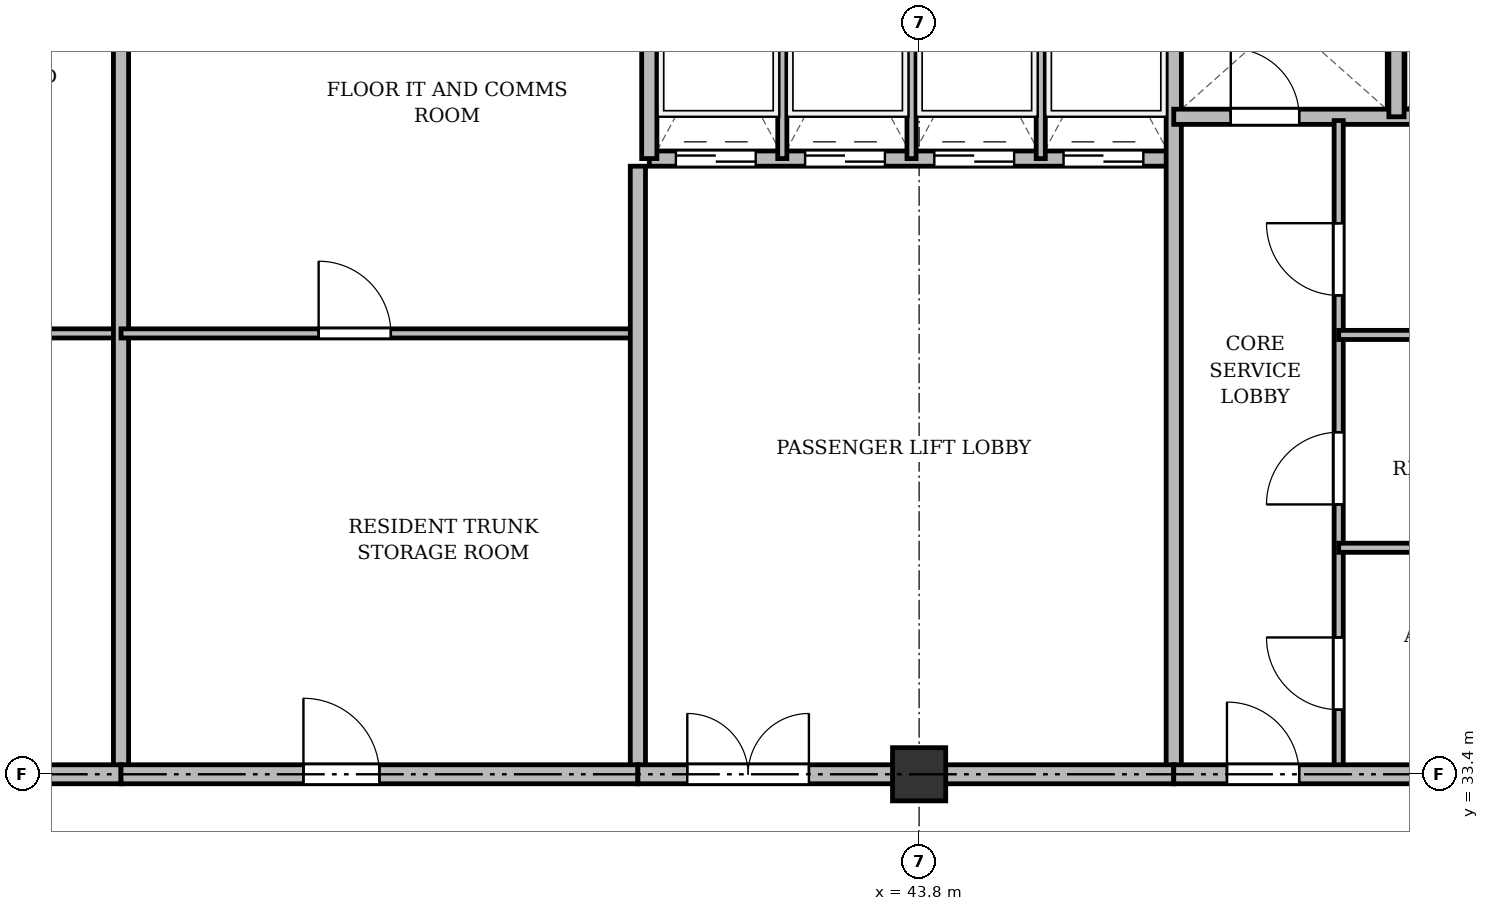
"""IFC4 building model, lengths in metres.
Left out: names, types, materials, properties, quantities, classifications, styles, units other than length and angle.
Written with IfcOpenShell. Run it as: python <this file> out.ifc"""

import sys

from ifc_helpers import new_model, si_unit, direction, frame, frame_2d, origin, origin_2d, place, context, subcontext, project, spatial, rectangle, extrude, source, transform, mapped, element, fill, save


model = new_model("IFC4")
c1 = context("Model", 3, precision=1e-05, world=origin(), true_north=direction((0.0, 1.0)))
c2 = subcontext(c1, "Body", "Model", "MODEL_VIEW")
j1 = project(units=[si_unit("LENGTHUNIT", "METRE"), si_unit("PLANEANGLEUNIT", "RADIAN")], contexts=[c1])
p1 = place(None, origin())
s1 = spatial("IfcSite", under=j1, at=p1, CompositionType="ELEMENT")
p2 = place(p1, origin())
s2 = spatial("IfcBuilding", under=s1, at=p2, CompositionType="ELEMENT")
p3 = place(p2, frame((0.0, 0.0, 222.9)))
s3 = spatial("IfcBuildingStorey", under=s2, at=p3, CompositionType="ELEMENT", Elevation=222.9)
m1 = source(origin(), c2, "Body", "SweptSolid", [
    extrude(rectangle(XDim=0.7, YDim=0.7, at=origin_2d()), origin(), (0.0, 0.0, 1.0), 3.6),
])
p4 = place(p3, frame((43.8, 33.4, 0.0), z_axis=(0.0, 0.0, 1.0), x_axis=(1.0, 0.0, 0.0)))
e1 = element("IfcColumn", 1, at=p4, inside=s3, PredefinedType="COLUMN", context=c2, shape_type="MappedRepresentation", body=[
    mapped(m1, transform((0.0, 0.0, 0.0), x_axis=(1.0, 0.0, 0.0), y_axis=(0.0, 1.0, 0.0), z_axis=(0.0, 0.0, 1.0), scale=1.0)),
])
p5 = place(p3, frame((26.3, 39.2, 0.0), z_axis=(0.0, 0.0, 1.0), x_axis=(1.0, 0.0, 0.0)))
e2 = element("IfcWall", 2, at=p5, inside=s3, PredefinedType="PARTITIONING", context=c2, shape_type="SweptSolid", body=[
    extrude(rectangle(XDim=7.0, YDim=0.12, at=frame_2d((3.5, 0.0))), origin(), (0.0, 0.0, 1.0), 2.86),
])
p6 = place(p5, frame((2.6, 0.0, 0.0)))
e3 = element("IfcOpeningElement", 3, at=p6, cuts=e2, PredefinedType="OPENING", context=c2, shape_type="SweptSolid", body=[
    extrude(rectangle(XDim=0.95, YDim=2.15, at=frame_2d((0.475, 1.075))), frame((0.0, 0.07, 0.0), z_axis=(0.0, -1.0, 0.0), x_axis=(1.0, 0.0, 0.0)), (0.0, 0.0, 1.0), 0.14),
])
p7 = place(p3, frame((33.3, 33.4, 0.0), z_axis=(0.0, 0.0, 1.0), x_axis=(0.0, 1.0, 0.0)))
e4 = element("IfcWall", 4, at=p7, inside=s3, PredefinedType="SOLIDWALL", context=c2, shape_type="SweptSolid", body=[
    extrude(rectangle(XDim=11.3, YDim=0.2, at=frame_2d((5.65, 0.0))), origin(), (0.0, 0.0, 1.0), 2.91),
])
p8 = place(p3, frame((33.3, 39.2, 0.0), z_axis=(0.0, 0.0, 1.0), x_axis=(1.0, 0.0, 0.0)))
e5 = element("IfcWall", 5, at=p8, inside=s3, PredefinedType="PARTITIONING", context=c2, shape_type="SweptSolid", body=[
    extrude(rectangle(XDim=6.8, YDim=0.12, at=frame_2d((3.4, 0.0))), origin(), (0.0, 0.0, 1.0), 3.36),
])
p9 = place(p8, frame((2.6, 0.0, 0.0)))
e6 = element("IfcOpeningElement", 6, at=p9, cuts=e5, PredefinedType="OPENING", context=c2, shape_type="SweptSolid", body=[
    extrude(rectangle(XDim=0.95, YDim=2.15, at=frame_2d((0.475, 1.075))), frame((0.0, 0.07, 0.0), z_axis=(0.0, -1.0, 0.0), x_axis=(1.0, 0.0, 0.0)), (0.0, 0.0, 1.0), 0.14),
])
p10 = place(p3, frame((40.1, 33.4, 0.0), z_axis=(0.0, 0.0, 1.0), x_axis=(0.0, 1.0, 0.0)))
e7 = element("IfcWall", 7, at=p10, inside=s3, PredefinedType="SOLIDWALL", context=c2, shape_type="SweptSolid", body=[
    extrude(rectangle(XDim=8.0, YDim=0.2, at=frame_2d((4.0, 0.0))), origin(), (0.0, 0.0, 1.0), 2.91),
])
p11 = place(p3, frame((40.25, 41.5, 0.0), z_axis=(0.0, 0.0, 1.0), x_axis=(1.0, 0.0, 0.0)))
e8 = element("IfcWall", 8, at=p11, inside=s3, PredefinedType="SOLIDWALL", context=c2, shape_type="SweptSolid", body=[
    extrude(rectangle(XDim=6.9, YDim=0.2, at=frame_2d((3.45, 0.0))), origin(), (0.0, 0.0, 1.0), 3.36),
])
p12 = place(p11, frame((0.35, 0.0, 0.0)))
e9 = element("IfcOpeningElement", 9, at=p12, cuts=e8, PredefinedType="OPENING", context=c2, shape_type="SweptSolid", body=[
    extrude(rectangle(XDim=1.05, YDim=2.15, at=frame_2d((0.525, 1.075))), frame((0.0, 0.11, 0.0), z_axis=(0.0, -1.0, 0.0), x_axis=(1.0, 0.0, 0.0)), (0.0, 0.0, 1.0), 0.22),
])
p13 = place(p11, frame((2.05, 0.0, 0.0)))
e10 = element("IfcOpeningElement", 10, at=p13, cuts=e8, PredefinedType="OPENING", context=c2, shape_type="SweptSolid", body=[
    extrude(rectangle(XDim=1.05, YDim=2.15, at=frame_2d((0.525, 1.075))), frame((0.0, 0.11, 0.0), z_axis=(0.0, -1.0, 0.0), x_axis=(1.0, 0.0, 0.0)), (0.0, 0.0, 1.0), 0.22),
])
p14 = place(p11, frame((3.75, 0.0, 0.0)))
e11 = element("IfcOpeningElement", 11, at=p14, cuts=e8, PredefinedType="OPENING", context=c2, shape_type="SweptSolid", body=[
    extrude(rectangle(XDim=1.05, YDim=2.15, at=frame_2d((0.525, 1.075))), frame((0.0, 0.11, 0.0), z_axis=(0.0, -1.0, 0.0), x_axis=(1.0, 0.0, 0.0)), (0.0, 0.0, 1.0), 0.22),
])
p15 = place(p11, frame((5.45, 0.0, 0.0)))
e12 = element("IfcOpeningElement", 12, at=p15, cuts=e8, PredefinedType="OPENING", context=c2, shape_type="SweptSolid", body=[
    extrude(rectangle(XDim=1.05, YDim=2.15, at=frame_2d((0.525, 1.075))), frame((0.0, 0.11, 0.0), z_axis=(0.0, -1.0, 0.0), x_axis=(1.0, 0.0, 0.0)), (0.0, 0.0, 1.0), 0.22),
])
p16 = place(p3, frame((40.25, 41.5, 0.0), z_axis=(0.0, 0.0, 1.0), x_axis=(0.0, 1.0, 0.0)))
e13 = element("IfcWall", 13, at=p16, inside=s3, PredefinedType="SOLIDWALL", context=c2, shape_type="SweptSolid", body=[
    extrude(rectangle(XDim=3.2, YDim=0.2, at=frame_2d((1.6, 0.0))), origin(), (0.0, 0.0, 1.0), 3.36),
])
for number, where, z_axis, x_axis in (
    (14, (42.0, 41.5, 0.0), (0.0, 0.0, 1.0), (0.0, 1.0, 0.0)),
    (15, (43.7, 41.5, 0.0), (0.0, 0.0, 1.0), (0.0, 1.0, 0.0)),
    (16, (45.4, 41.5, 0.0), (0.0, 0.0, 1.0), (0.0, 1.0, 0.0)),
):
    element("IfcWall", number, at=place(p3, frame(where, z_axis=z_axis, x_axis=x_axis)), inside=s3, PredefinedType="PARTITIONING", context=c2, shape_type="SweptSolid", body=[
        extrude(rectangle(XDim=3.2, YDim=0.12, at=frame_2d((1.6, 0.0))), origin(), (0.0, 0.0, 1.0), 3.36),
    ])
p17 = place(p3, frame((47.15, 33.4, 0.0), z_axis=(0.0, 0.0, 1.0), x_axis=(0.0, 1.0, 0.0)))
e17 = element("IfcWall", 17, at=p17, inside=s3, PredefinedType="SOLIDWALL", context=c2, shape_type="SweptSolid", body=[
    extrude(rectangle(XDim=11.3, YDim=0.2, at=frame_2d((5.65, 0.0))), origin(), (0.0, 0.0, 1.0), 2.91),
])
p18 = place(p3, frame((26.3, 33.4, 0.0), z_axis=(0.0, 0.0, 1.0), x_axis=(1.0, 0.0, 0.0)))
e18 = element("IfcWall", 18, at=p18, inside=s3, PredefinedType="PARTITIONING", context=c2, shape_type="SweptSolid", body=[
    extrude(rectangle(XDim=7.0, YDim=0.25, at=frame_2d((3.5, 0.0))), origin(), (0.0, 0.0, 1.0), 2.91),
])
p19 = place(p18, frame((1.35, 0.0, 0.0)))
e19 = element("IfcOpeningElement", 19, at=p19, cuts=e18, PredefinedType="OPENING", context=c2, shape_type="SweptSolid", body=[
    extrude(rectangle(XDim=0.95, YDim=2.15, at=frame_2d((0.475, 1.075))), frame((0.0, 0.135, 0.0), z_axis=(0.0, -1.0, 0.0), x_axis=(1.0, 0.0, 0.0)), (0.0, 0.0, 1.0), 0.27),
])
p20 = place(p3, frame((33.3, 33.4, 0.0), z_axis=(0.0, 0.0, 1.0), x_axis=(1.0, 0.0, 0.0)))
e20 = element("IfcWall", 20, at=p20, inside=s3, PredefinedType="PARTITIONING", context=c2, shape_type="SweptSolid", body=[
    extrude(rectangle(XDim=6.8, YDim=0.25, at=frame_2d((3.4, 0.0))), origin(), (0.0, 0.0, 1.0), 2.91),
])
p21 = place(p20, frame((2.4, 0.0, 0.0)))
e21 = element("IfcOpeningElement", 21, at=p21, cuts=e20, PredefinedType="OPENING", context=c2, shape_type="SweptSolid", body=[
    extrude(rectangle(XDim=1.0, YDim=2.15, at=frame_2d((0.5, 1.075))), frame((0.0, 0.135, 0.0), z_axis=(0.0, -1.0, 0.0), x_axis=(1.0, 0.0, 0.0)), (0.0, 0.0, 1.0), 0.27),
])
p22 = place(p3, frame((40.1, 33.4, 0.0), z_axis=(0.0, 0.0, 1.0), x_axis=(1.0, 0.0, 0.0)))
e22 = element("IfcWall", 22, at=p22, inside=s3, PredefinedType="PARTITIONING", context=c2, shape_type="SweptSolid", body=[
    extrude(rectangle(XDim=7.05, YDim=0.25, at=frame_2d((3.525, 0.0))), origin(), (0.0, 0.0, 1.0), 2.91),
])
p23 = place(p22, frame((0.65, 0.0, 0.0)))
e23 = element("IfcOpeningElement", 23, at=p23, cuts=e22, PredefinedType="OPENING", context=c2, shape_type="SweptSolid", body=[
    extrude(rectangle(XDim=1.6, YDim=2.2, at=frame_2d((0.8, 1.1))), frame((0.0, 0.135, 0.0), z_axis=(0.0, -1.0, 0.0), x_axis=(1.0, 0.0, 0.0)), (0.0, 0.0, 1.0), 0.27),
])
p24 = place(p3, frame((47.15, 42.05, 0.0), z_axis=(0.0, 0.0, 1.0), x_axis=(1.0, 0.0, 0.0)))
e24 = element("IfcWall", 24, at=p24, inside=s3, PredefinedType="SOLIDWALL", context=c2, shape_type="SweptSolid", body=[
    extrude(rectangle(XDim=7.85, YDim=0.2, at=frame_2d((3.925, 0.0))), origin(), (0.0, 0.0, 1.0), 2.86),
])
p25 = place(p24, frame((0.75, 0.0, 0.0)))
e25 = element("IfcOpeningElement", 25, at=p25, cuts=e24, PredefinedType="OPENING", context=c2, shape_type="SweptSolid", body=[
    extrude(rectangle(XDim=0.9, YDim=2.1, at=frame_2d((0.45, 1.05))), frame((0.0, 0.11, 0.0), z_axis=(0.0, -1.0, 0.0), x_axis=(1.0, 0.0, 0.0)), (0.0, 0.0, 1.0), 0.22),
])
p26 = place(p24, frame((3.85, 0.0, 0.0)))
e26 = element("IfcOpeningElement", 26, at=p26, cuts=e24, PredefinedType="OPENING", context=c2, shape_type="SweptSolid", body=[
    extrude(rectangle(XDim=0.9, YDim=2.1, at=frame_2d((0.45, 1.05))), frame((0.0, 0.11, 0.0), z_axis=(0.0, -1.0, 0.0), x_axis=(1.0, 0.0, 0.0)), (0.0, 0.0, 1.0), 0.22),
])
p27 = place(p3, frame((50.08, 42.05, 0.0), z_axis=(0.0, 0.0, 1.0), x_axis=(0.0, 1.0, 0.0)))
e27 = element("IfcWall", 27, at=p27, inside=s3, PredefinedType="SOLIDWALL", context=c2, shape_type="SweptSolid", body=[
    extrude(rectangle(XDim=2.65, YDim=0.2, at=frame_2d((1.325, 0.0))), origin(), (0.0, 0.0, 1.0), 3.36),
])
p28 = place(p3, frame((49.32, 33.4, 0.0), z_axis=(0.0, 0.0, 1.0), x_axis=(0.0, 1.0, 0.0)))
e28 = element("IfcWall", 28, at=p28, inside=s3, PredefinedType="PARTITIONING", context=c2, shape_type="SweptSolid", body=[
    extrude(rectangle(XDim=8.6, YDim=0.12, at=frame_2d((4.3, 0.0))), origin(), (0.0, 0.0, 1.0), 2.91),
])
p29 = place(p28, frame((0.85, 0.0, 0.0)))
e29 = element("IfcOpeningElement", 29, at=p29, cuts=e28, PredefinedType="OPENING", context=c2, shape_type="SweptSolid", body=[
    extrude(rectangle(XDim=0.95, YDim=2.15, at=frame_2d((0.475, 1.075))), frame((0.0, 0.07, 0.0), z_axis=(0.0, -1.0, 0.0), x_axis=(1.0, 0.0, 0.0)), (0.0, 0.0, 1.0), 0.14),
])
p30 = place(p28, frame((3.55, 0.0, 0.0)))
e30 = element("IfcOpeningElement", 30, at=p30, cuts=e28, PredefinedType="OPENING", context=c2, shape_type="SweptSolid", body=[
    extrude(rectangle(XDim=0.95, YDim=2.15, at=frame_2d((0.475, 1.075))), frame((0.0, 0.07, 0.0), z_axis=(0.0, -1.0, 0.0), x_axis=(1.0, 0.0, 0.0)), (0.0, 0.0, 1.0), 0.14),
])
p31 = place(p28, frame((6.3, 0.0, 0.0)))
e31 = element("IfcOpeningElement", 31, at=p31, cuts=e28, PredefinedType="OPENING", context=c2, shape_type="SweptSolid", body=[
    extrude(rectangle(XDim=0.95, YDim=2.15, at=frame_2d((0.475, 1.075))), frame((0.0, 0.07, 0.0), z_axis=(0.0, -1.0, 0.0), x_axis=(1.0, 0.0, 0.0)), (0.0, 0.0, 1.0), 0.14),
])
for number, where, z_axis, x_axis in (
    (32, (49.32, 36.38, 0.0), (0.0, 0.0, 1.0), (1.0, 0.0, 0.0)),
    (33, (49.32, 39.18, 0.0), (0.0, 0.0, 1.0), (1.0, 0.0, 0.0)),
):
    element("IfcWall", number, at=place(p3, frame(where, z_axis=z_axis, x_axis=x_axis)), inside=s3, PredefinedType="PARTITIONING", context=c2, shape_type="SweptSolid", body=[
        extrude(rectangle(XDim=3.13, YDim=0.12, at=frame_2d((1.565, 0.0))), origin(), (0.0, 0.0, 1.0), 2.86),
    ])
p32 = place(p3, frame((47.15, 33.4, 0.0), z_axis=(0.0, 0.0, 1.0), x_axis=(1.0, 0.0, 0.0)))
e34 = element("IfcWall", 34, at=p32, inside=s3, PredefinedType="PARTITIONING", context=c2, shape_type="SweptSolid", body=[
    extrude(rectangle(XDim=11.15, YDim=0.25, at=frame_2d((5.575, 0.0))), origin(), (0.0, 0.0, 1.0), 2.91),
])
p33 = place(p32, frame((0.7, 0.0, 0.0)))
e35 = element("IfcOpeningElement", 35, at=p33, cuts=e34, PredefinedType="OPENING", context=c2, shape_type="SweptSolid", body=[
    extrude(rectangle(XDim=0.95, YDim=2.15, at=frame_2d((0.475, 1.075))), frame((0.0, 0.135, 0.0), z_axis=(0.0, -1.0, 0.0), x_axis=(1.0, 0.0, 0.0)), (0.0, 0.0, 1.0), 0.27),
])
p34 = place(p32, frame((6.0, 0.0, 0.0)))
e36 = element("IfcOpeningElement", 36, at=p34, cuts=e34, PredefinedType="OPENING", context=c2, shape_type="SweptSolid", body=[
    extrude(rectangle(XDim=1.2, YDim=2.15, at=frame_2d((0.6, 1.075))), frame((0.0, 0.135, 0.0), z_axis=(0.0, -1.0, 0.0), x_axis=(1.0, 0.0, 0.0)), (0.0, 0.0, 1.0), 0.27),
])
m2 = source(origin(), c2, "Body", "SweptSolid", [
    extrude(rectangle(XDim=0.95, YDim=2.15, at=frame_2d((0.475, 1.075))), frame((0.0, 0.025, 0.0), z_axis=(0.0, -1.0, 0.0), x_axis=(1.0, 0.0, 0.0)), (0.0, 0.0, 1.0), 0.05),
])
p35 = place(p9, origin())
e37 = element("IfcDoor", 37, at=p35, inside=s3, OperationType="SINGLE_SWING_LEFT", PredefinedType="DOOR", context=c2, shape_type="MappedRepresentation", body=[
    mapped(m2, transform((0.0, 0.0, 0.0), x_axis=(1.0, 0.0, 0.0), y_axis=(0.0, 1.0, 0.0), z_axis=(0.0, 0.0, 1.0), scale=1.0)),
])
fill(e6, e37)
m3 = source(origin(), c2, "Body", "SweptSolid", [
    extrude(rectangle(XDim=1.05, YDim=2.15, at=frame_2d((0.525, 1.075))), frame((0.0, 0.025, 0.0), z_axis=(0.0, -1.0, 0.0), x_axis=(1.0, 0.0, 0.0)), (0.0, 0.0, 1.0), 0.05),
])
p36 = place(p12, origin())
e38 = element("IfcDoor", 38, at=p36, inside=s3, OperationType="DOUBLE_DOOR_SLIDING", PredefinedType="DOOR", context=c2, shape_type="MappedRepresentation", body=[
    mapped(m3, transform((0.0, 0.0, 0.0), x_axis=(1.0, 0.0, 0.0), y_axis=(0.0, 1.0, 0.0), z_axis=(0.0, 0.0, 1.0), scale=1.0)),
])
fill(e9, e38)
p37 = place(p13, origin())
e39 = element("IfcDoor", 39, at=p37, inside=s3, OperationType="DOUBLE_DOOR_SLIDING", PredefinedType="DOOR", context=c2, shape_type="MappedRepresentation", body=[
    mapped(m3, transform((0.0, 0.0, 0.0), x_axis=(1.0, 0.0, 0.0), y_axis=(0.0, 1.0, 0.0), z_axis=(0.0, 0.0, 1.0), scale=1.0)),
])
fill(e10, e39)
p38 = place(p14, origin())
e40 = element("IfcDoor", 40, at=p38, inside=s3, OperationType="DOUBLE_DOOR_SLIDING", PredefinedType="DOOR", context=c2, shape_type="MappedRepresentation", body=[
    mapped(m3, transform((0.0, 0.0, 0.0), x_axis=(1.0, 0.0, 0.0), y_axis=(0.0, 1.0, 0.0), z_axis=(0.0, 0.0, 1.0), scale=1.0)),
])
fill(e11, e40)
p39 = place(p15, origin())
e41 = element("IfcDoor", 41, at=p39, inside=s3, OperationType="DOUBLE_DOOR_SLIDING", PredefinedType="DOOR", context=c2, shape_type="MappedRepresentation", body=[
    mapped(m3, transform((0.0, 0.0, 0.0), x_axis=(1.0, 0.0, 0.0), y_axis=(0.0, 1.0, 0.0), z_axis=(0.0, 0.0, 1.0), scale=1.0)),
])
fill(e12, e41)
m4 = source(origin(), c2, "Body", "SweptSolid", [
    extrude(rectangle(XDim=1.0, YDim=2.15, at=frame_2d((0.5, 1.075))), frame((0.0, 0.025, 0.0), z_axis=(0.0, -1.0, 0.0), x_axis=(1.0, 0.0, 0.0)), (0.0, 0.0, 1.0), 0.05),
])
p40 = place(p21, origin())
e42 = element("IfcDoor", 42, at=p40, inside=s3, OperationType="SINGLE_SWING_LEFT", PredefinedType="DOOR", context=c2, shape_type="MappedRepresentation", body=[
    mapped(m4, transform((0.0, 0.0, 0.0), x_axis=(1.0, 0.0, 0.0), y_axis=(0.0, 1.0, 0.0), z_axis=(0.0, 0.0, 1.0), scale=1.0)),
])
fill(e21, e42)
m5 = source(origin(), c2, "Body", "SweptSolid", [
    extrude(rectangle(XDim=1.6, YDim=2.2, at=frame_2d((0.8, 1.1))), frame((0.0, 0.025, 0.0), z_axis=(0.0, -1.0, 0.0), x_axis=(1.0, 0.0, 0.0)), (0.0, 0.0, 1.0), 0.05),
])
p41 = place(p23, origin())
e43 = element("IfcDoor", 43, at=p41, inside=s3, OperationType="DOUBLE_DOOR_SINGLE_SWING", PredefinedType="DOOR", context=c2, shape_type="MappedRepresentation", body=[
    mapped(m5, transform((0.0, 0.0, 0.0), x_axis=(1.0, 0.0, 0.0), y_axis=(0.0, 1.0, 0.0), z_axis=(0.0, 0.0, 1.0), scale=1.0)),
])
fill(e23, e43)
m6 = source(origin(), c2, "Body", "SweptSolid", [
    extrude(rectangle(XDim=0.9, YDim=2.1, at=frame_2d((0.45, 1.05))), frame((0.0, 0.025, 0.0), z_axis=(0.0, -1.0, 0.0), x_axis=(1.0, 0.0, 0.0)), (0.0, 0.0, 1.0), 0.05),
])
p42 = place(p25, origin())
e44 = element("IfcDoor", 44, at=p42, inside=s3, OperationType="SINGLE_SWING_LEFT", PredefinedType="DOOR", context=c2, shape_type="MappedRepresentation", body=[
    mapped(m6, transform((0.0, 0.0, 0.0), x_axis=(1.0, 0.0, 0.0), y_axis=(0.0, 1.0, 0.0), z_axis=(0.0, 0.0, 1.0), scale=1.0)),
])
fill(e25, e44)
p43 = place(p29, origin())
e45 = element("IfcDoor", 45, at=p43, inside=s3, OperationType="SINGLE_SWING_RIGHT", PredefinedType="DOOR", context=c2, shape_type="MappedRepresentation", body=[
    mapped(m2, transform((0.0, 0.0, 0.0), x_axis=(1.0, 0.0, 0.0), y_axis=(0.0, 1.0, 0.0), z_axis=(0.0, 0.0, 1.0), scale=1.0)),
])
fill(e29, e45)
p44 = place(p30, origin())
e46 = element("IfcDoor", 46, at=p44, inside=s3, OperationType="SINGLE_SWING_LEFT", PredefinedType="DOOR", context=c2, shape_type="MappedRepresentation", body=[
    mapped(m2, transform((0.0, 0.0, 0.0), x_axis=(1.0, 0.0, 0.0), y_axis=(0.0, 1.0, 0.0), z_axis=(0.0, 0.0, 1.0), scale=1.0)),
])
fill(e30, e46)
p45 = place(p31, origin())
e47 = element("IfcDoor", 47, at=p45, inside=s3, OperationType="SINGLE_SWING_RIGHT", PredefinedType="DOOR", context=c2, shape_type="MappedRepresentation", body=[
    mapped(m2, transform((0.0, 0.0, 0.0), x_axis=(1.0, 0.0, 0.0), y_axis=(0.0, 1.0, 0.0), z_axis=(0.0, 0.0, 1.0), scale=1.0)),
])
fill(e31, e47)
p46 = place(p33, origin())
e48 = element("IfcDoor", 48, at=p46, inside=s3, OperationType="SINGLE_SWING_LEFT", PredefinedType="DOOR", context=c2, shape_type="MappedRepresentation", body=[
    mapped(m2, transform((0.0, 0.0, 0.0), x_axis=(1.0, 0.0, 0.0), y_axis=(0.0, 1.0, 0.0), z_axis=(0.0, 0.0, 1.0), scale=1.0)),
])
fill(e35, e48)
save(model, sys.argv[1])
